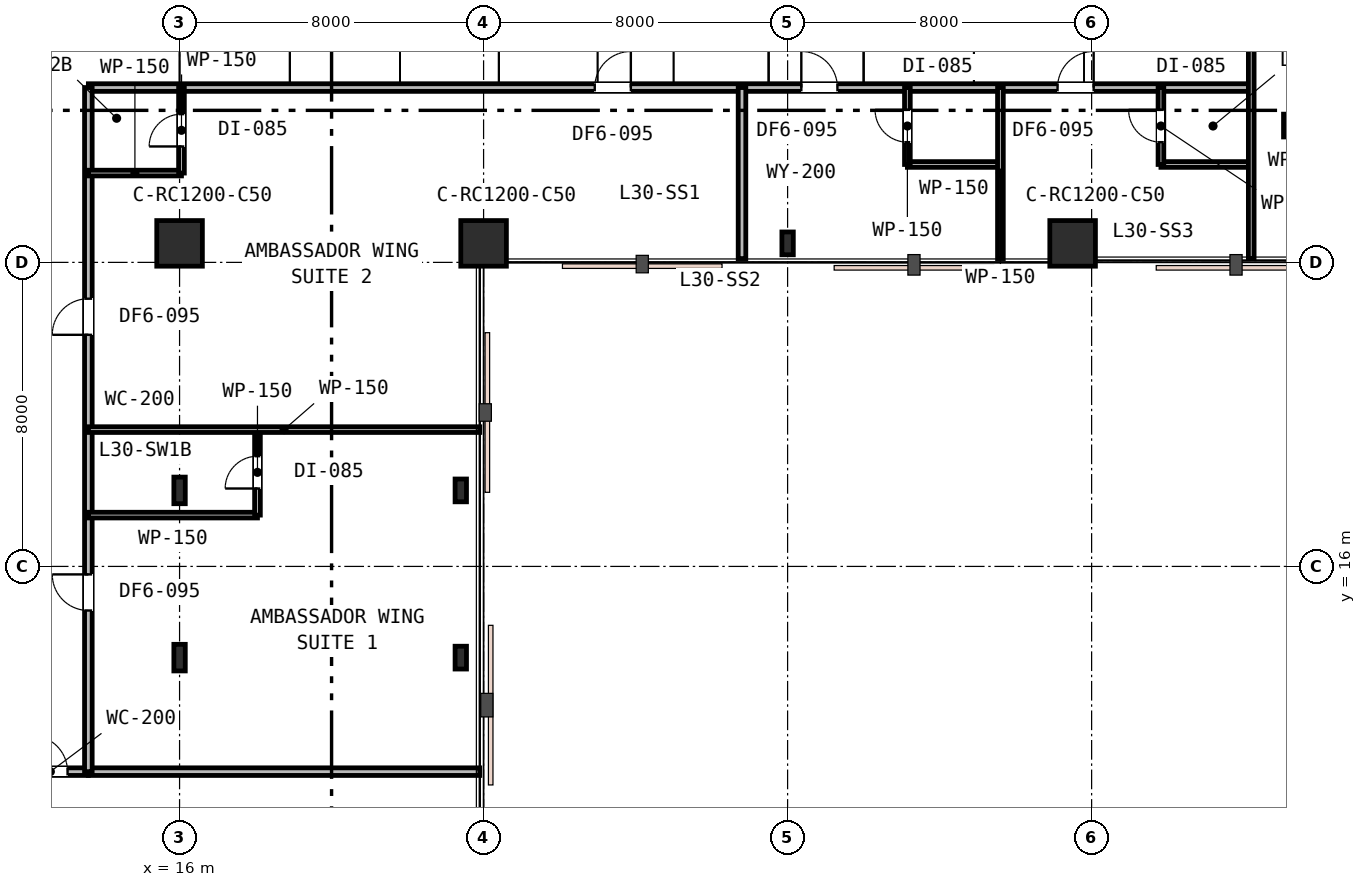
"""IFC4 building model, lengths in metres.
Left out: names, types, materials, properties, quantities, classifications, styles, units other than length and angle.
Written with IfcOpenShell. Run it as: python <this file> out.ifc"""

import sys

from ifc_helpers import new_model, si_unit, direction, frame, frame_2d, origin, origin_2d, place, context, subcontext, project, spatial, rectangle, i_section, extrude, element, fill, save


model = new_model("IFC4")
c1 = context("Model", 3, precision=1e-05, world=origin(), true_north=direction((0.0, 1.0)))
c2 = subcontext(c1, "Body", "Model", "MODEL_VIEW")
j1 = project(units=[si_unit("LENGTHUNIT", "METRE"), si_unit("PLANEANGLEUNIT", "RADIAN")], contexts=[c1])
p1 = place(None, origin())
s1 = spatial("IfcSite", under=j1, at=p1, CompositionType="ELEMENT")
p2 = place(p1, origin())
s2 = spatial("IfcBuilding", under=s1, at=p2, CompositionType="ELEMENT")
p3 = place(p2, frame((0.0, 0.0, 118.8)))
s3 = spatial("IfcBuildingStorey", under=s2, at=p3, CompositionType="ELEMENT", Elevation=118.8)
for number, where, z_axis, x_axis in (
    (1, (16.0, 24.5, 0.0), (0.0, 0.0, 1.0), (1.0, 0.0, 0.0)),
    (2, (24.0, 24.5, 0.0), (0.0, 0.0, 1.0), (1.0, 0.0, 0.0)),
):
    element("IfcColumn", number, at=place(p3, frame(where, z_axis=z_axis, x_axis=x_axis)), inside=s3, PredefinedType="COLUMN", context=c2, shape_type="SweptSolid", body=[
        extrude(rectangle(XDim=1.2, YDim=1.2, at=origin_2d()), origin(), (0.0, 0.0, 1.0), 3.6),
    ])
p4 = place(p3, frame((32.0, 24.5, 0.0), z_axis=(0.0, 0.0, 1.0), x_axis=(1.0, 0.0, 0.0)))
e3 = element("IfcColumn", 3, at=p4, inside=s3, PredefinedType="COLUMN", context=c2, shape_type="SweptSolid", body=[
    extrude(i_section(OverallWidth=0.3, OverallDepth=0.6, WebThickness=0.015, FlangeThickness=0.03, FilletRadius=0.027, at=origin_2d()), origin(), (0.0, 0.0, 1.0), 3.6),
])
p5 = place(p3, frame((39.5, 24.5, 0.0), z_axis=(0.0, 0.0, 1.0), x_axis=(1.0, 0.0, 0.0)))
e4 = element("IfcColumn", 4, at=p5, inside=s3, PredefinedType="COLUMN", context=c2, shape_type="SweptSolid", body=[
    extrude(rectangle(XDim=1.2, YDim=1.2, at=origin_2d()), origin(), (0.0, 0.0, 1.0), 3.6),
])
for number, where, z_axis, x_axis in (
    (5, (45.2, 27.6, 0.0), (0.0, 0.0, 1.0), (1.0, 0.0, 0.0)),
    (6, (23.4, 13.6, 0.0), (0.0, 0.0, 1.0), (1.0, 0.0, 0.0)),
    (7, (23.4, 18.0, 0.0), (0.0, 0.0, 1.0), (1.0, 0.0, 0.0)),
):
    element("IfcColumn", number, at=place(p3, frame(where, z_axis=z_axis, x_axis=x_axis)), inside=s3, PredefinedType="COLUMN", context=c2, shape_type="SweptSolid", body=[
        extrude(i_section(OverallWidth=0.3, OverallDepth=0.6, WebThickness=0.015, FlangeThickness=0.03, FilletRadius=0.027, at=origin_2d()), origin(), (0.0, 0.0, 1.0), 3.6),
    ])
for number, where, z_axis, x_axis in (
    (8, (16.0, 13.6, 0.0), (0.0, 0.0, 1.0), (1.0, 0.0, 0.0)),
    (9, (16.0, 18.0, 0.0), (0.0, 0.0, 1.0), (1.0, 0.0, 0.0)),
):
    element("IfcColumn", number, at=place(p3, frame(where, z_axis=z_axis, x_axis=x_axis)), inside=s3, PredefinedType="COLUMN", context=c2, shape_type="SweptSolid", body=[
        extrude(i_section(OverallWidth=0.3, OverallDepth=0.7, WebThickness=0.017, FlangeThickness=0.032, FilletRadius=0.027, at=origin_2d()), origin(), (0.0, 0.0, 1.0), 3.6),
    ])
p6 = place(p3, frame((13.6, 28.6, 0.0), z_axis=(0.0, 0.0, 1.0), x_axis=(1.0, 0.0, 0.0)))
e10 = element("IfcWall", 10, at=p6, inside=s3, PredefinedType="PARTITIONING", context=c2, shape_type="SweptSolid", body=[
    extrude(rectangle(XDim=30.6, YDim=0.2, at=frame_2d((15.3, 0.0))), origin(), (0.0, 0.0, 1.0), 2.87),
])
p7 = place(p6, frame((13.325, 0.0, 0.0)))
e11 = element("IfcOpeningElement", 11, at=p7, cuts=e10, PredefinedType="OPENING", context=c2, shape_type="SweptSolid", body=[
    extrude(rectangle(XDim=0.95, YDim=2.15, at=frame_2d((0.475, 1.075))), frame((0.0, 0.11, 0.0), z_axis=(0.0, -1.0, 0.0), x_axis=(1.0, 0.0, 0.0)), (0.0, 0.0, 1.0), 0.22),
])
p8 = place(p6, frame((18.761, 0.0, 0.0)))
e12 = element("IfcOpeningElement", 12, at=p8, cuts=e10, PredefinedType="OPENING", context=c2, shape_type="SweptSolid", body=[
    extrude(rectangle(XDim=0.95, YDim=2.15, at=frame_2d((0.475, 1.075))), frame((0.0, 0.11, 0.0), z_axis=(0.0, -1.0, 0.0), x_axis=(1.0, 0.0, 0.0)), (0.0, 0.0, 1.0), 0.22),
])
p9 = place(p6, frame((25.503, 0.0, 0.0)))
e13 = element("IfcOpeningElement", 13, at=p9, cuts=e10, PredefinedType="OPENING", context=c2, shape_type="SweptSolid", body=[
    extrude(rectangle(XDim=0.95, YDim=2.15, at=frame_2d((0.475, 1.075))), frame((0.0, 0.11, 0.0), z_axis=(0.0, -1.0, 0.0), x_axis=(1.0, 0.0, 0.0)), (0.0, 0.0, 1.0), 0.22),
])
p10 = place(p3, frame((13.6, 10.6, 0.0), z_axis=(0.0, 0.0, 1.0), x_axis=(1.0, 0.0, 0.0)))
e14 = element("IfcWall", 14, at=p10, inside=s3, PredefinedType="PARTITIONING", context=c2, shape_type="SweptSolid", body=[
    extrude(rectangle(XDim=10.3, YDim=0.2, at=frame_2d((5.15, 0.0))), origin(), (0.0, 0.0, 1.0), 2.87),
])
p11 = place(p3, frame((11.6, 10.6, 0.0), z_axis=(0.0, 0.0, 1.0), x_axis=(1.0, 0.0, 0.0)))
e15 = element("IfcWall", 15, at=p11, inside=s3, PredefinedType="PARTITIONING", context=c2, shape_type="SweptSolid", body=[
    extrude(rectangle(XDim=2.0, YDim=0.2, at=frame_2d((1.0, 0.0))), origin(), (0.0, 0.0, 1.0), 3.01),
])
p12 = place(p11, frame((0.502, 0.0, 0.0)))
e16 = element("IfcOpeningElement", 16, at=p12, cuts=e15, PredefinedType="OPENING", context=c2, shape_type="SweptSolid", body=[
    extrude(rectangle(XDim=0.95, YDim=2.15, at=frame_2d((0.475, 1.075))), frame((0.0, 0.11, 0.0), z_axis=(0.0, -1.0, 0.0), x_axis=(1.0, 0.0, 0.0)), (0.0, 0.0, 1.0), 0.22),
])
p13 = place(p3, frame((13.6, 10.6, 0.0), z_axis=(0.0, 0.0, 1.0), x_axis=(0.0, 1.0, 0.0)))
e17 = element("IfcWall", 17, at=p13, inside=s3, PredefinedType="PARTITIONING", context=c2, shape_type="SweptSolid", body=[
    extrude(rectangle(XDim=18.0, YDim=0.2, at=frame_2d((9.0, 0.0))), origin(), (0.0, 0.0, 1.0), 2.87),
])
p14 = place(p13, frame((4.24, 0.0, 0.0)))
e18 = element("IfcOpeningElement", 18, at=p14, cuts=e17, PredefinedType="OPENING", context=c2, shape_type="SweptSolid", body=[
    extrude(rectangle(XDim=0.95, YDim=2.15, at=frame_2d((0.475, 1.075))), frame((0.0, 0.11, 0.0), z_axis=(0.0, -1.0, 0.0), x_axis=(1.0, 0.0, 0.0)), (0.0, 0.0, 1.0), 0.22),
])
p15 = place(p13, frame((11.494, 0.0, 0.0)))
e19 = element("IfcOpeningElement", 19, at=p15, cuts=e17, PredefinedType="OPENING", context=c2, shape_type="SweptSolid", body=[
    extrude(rectangle(XDim=0.95, YDim=2.15, at=frame_2d((0.475, 1.075))), frame((0.0, 0.11, 0.0), z_axis=(0.0, -1.0, 0.0), x_axis=(1.0, 0.0, 0.0)), (0.0, 0.0, 1.0), 0.22),
])
p16 = place(p3, frame((13.6, 17.35, 0.0), z_axis=(0.0, 0.0, 1.0), x_axis=(1.0, 0.0, 0.0)))
e20 = element("IfcWall", 20, at=p16, inside=s3, PredefinedType="PARTITIONING", context=c2, shape_type="SweptSolid", body=[
    extrude(rectangle(XDim=4.45, YDim=0.15, at=frame_2d((2.225, 0.0))), origin(), (0.0, 0.0, 1.0), 2.87),
])
p17 = place(p3, frame((18.05, 17.35, 0.0), z_axis=(0.0, 0.0, 1.0), x_axis=(0.0, 1.0, 0.0)))
e21 = element("IfcWall", 21, at=p17, inside=s3, PredefinedType="PARTITIONING", context=c2, shape_type="SweptSolid", body=[
    extrude(rectangle(XDim=2.25, YDim=0.15, at=frame_2d((1.125, 0.0))), origin(), (0.0, 0.0, 1.0), 2.87),
])
p18 = place(p17, frame((0.7, 0.0, 0.0)))
e22 = element("IfcOpeningElement", 22, at=p18, cuts=e21, PredefinedType="OPENING", context=c2, shape_type="SweptSolid", body=[
    extrude(rectangle(XDim=0.85, YDim=2.15, at=frame_2d((0.425, 1.075))), frame((0.0, 0.085, 0.0), z_axis=(0.0, -1.0, 0.0), x_axis=(1.0, 0.0, 0.0)), (0.0, 0.0, 1.0), 0.17),
])
p19 = place(p3, frame((13.6, 19.6, 0.0), z_axis=(0.0, 0.0, 1.0), x_axis=(1.0, 0.0, 0.0)))
e23 = element("IfcWall", 23, at=p19, inside=s3, PredefinedType="PARTITIONING", context=c2, shape_type="SweptSolid", body=[
    extrude(rectangle(XDim=10.3, YDim=0.15, at=frame_2d((5.15, 0.0))), origin(), (0.0, 0.0, 1.0), 2.87),
])
p20 = place(p3, frame((13.6, 26.35, 0.0), z_axis=(0.0, 0.0, 1.0), x_axis=(1.0, 0.0, 0.0)))
e24 = element("IfcWall", 24, at=p20, inside=s3, PredefinedType="PARTITIONING", context=c2, shape_type="SweptSolid", body=[
    extrude(rectangle(XDim=2.45, YDim=0.15, at=frame_2d((1.225, 0.0))), origin(), (0.0, 0.0, 1.0), 2.87),
])
p21 = place(p3, frame((16.05, 26.35, 0.0), z_axis=(0.0, 0.0, 1.0), x_axis=(0.0, 1.0, 0.0)))
e25 = element("IfcWall", 25, at=p21, inside=s3, PredefinedType="PARTITIONING", context=c2, shape_type="SweptSolid", body=[
    extrude(rectangle(XDim=2.25, YDim=0.15, at=frame_2d((1.125, 0.0))), origin(), (0.0, 0.0, 1.0), 2.87),
])
p22 = place(p21, frame((0.7, 0.0, 0.0)))
e26 = element("IfcOpeningElement", 26, at=p22, cuts=e25, PredefinedType="OPENING", context=c2, shape_type="SweptSolid", body=[
    extrude(rectangle(XDim=0.85, YDim=2.15, at=frame_2d((0.425, 1.075))), frame((0.0, 0.085, 0.0), z_axis=(0.0, -1.0, 0.0), x_axis=(1.0, 0.0, 0.0)), (0.0, 0.0, 1.0), 0.17),
])
p23 = place(p3, frame((30.8, 24.1, 0.0), z_axis=(0.0, 0.0, 1.0), x_axis=(0.0, 1.0, 0.0)))
e27 = element("IfcWall", 27, at=p23, inside=s3, PredefinedType="PARTITIONING", context=c2, shape_type="SweptSolid", body=[
    extrude(rectangle(XDim=4.5, YDim=0.2, at=frame_2d((2.25, 0.0))), origin(), (0.0, 0.0, 1.0), 2.96),
])
p24 = place(p3, frame((35.152, 26.576, 0.0), z_axis=(0.0, 0.0, 1.0), x_axis=(1.0, 0.0, 0.0)))
e28 = element("IfcWall", 28, at=p24, inside=s3, PredefinedType="PARTITIONING", context=c2, shape_type="SweptSolid", body=[
    extrude(rectangle(XDim=2.448, YDim=0.15, at=frame_2d((1.224, 0.0))), origin(), (0.0, 0.0, 1.0), 3.01),
])
p25 = place(p3, frame((35.152, 26.576, 0.0), z_axis=(0.0, 0.0, 1.0), x_axis=(0.0, 1.0, 0.0)))
e29 = element("IfcWall", 29, at=p25, inside=s3, PredefinedType="PARTITIONING", context=c2, shape_type="SweptSolid", body=[
    extrude(rectangle(XDim=2.024, YDim=0.15, at=frame_2d((1.012, 0.0))), origin(), (0.0, 0.0, 1.0), 3.33),
])
p26 = place(p25, frame((0.587, 0.0, 0.0)))
e30 = element("IfcOpeningElement", 30, at=p26, cuts=e29, PredefinedType="OPENING", context=c2, shape_type="SweptSolid", body=[
    extrude(rectangle(XDim=0.85, YDim=2.15, at=frame_2d((0.425, 1.075))), frame((0.0, 0.085, 0.0), z_axis=(0.0, -1.0, 0.0), x_axis=(1.0, 0.0, 0.0)), (0.0, 0.0, 1.0), 0.17),
])
p27 = place(p3, frame((37.6, 28.6, 0.0), z_axis=(0.0, 0.0, 1.0), x_axis=(0.0, -1.0, 0.0)))
e31 = element("IfcWall", 31, at=p27, inside=s3, PredefinedType="PARTITIONING", context=c2, shape_type="SweptSolid", body=[
    extrude(rectangle(XDim=4.5, YDim=0.15, at=frame_2d((2.25, 0.0))), origin(), (0.0, 0.0, 1.0), 2.96),
])
p28 = place(p3, frame((41.824, 26.576, 0.0), z_axis=(0.0, 0.0, 1.0), x_axis=(1.0, 0.0, 0.0)))
e32 = element("IfcWall", 32, at=p28, inside=s3, PredefinedType="PARTITIONING", context=c2, shape_type="SweptSolid", body=[
    extrude(rectangle(XDim=2.376, YDim=0.15, at=frame_2d((1.188, 0.0))), origin(), (0.0, 0.0, 1.0), 3.33),
])
p29 = place(p3, frame((41.824, 26.576, 0.0), z_axis=(0.0, 0.0, 1.0), x_axis=(0.0, 1.0, 0.0)))
e33 = element("IfcWall", 33, at=p29, inside=s3, PredefinedType="PARTITIONING", context=c2, shape_type="SweptSolid", body=[
    extrude(rectangle(XDim=2.024, YDim=0.15, at=frame_2d((1.012, 0.0))), origin(), (0.0, 0.0, 1.0), 3.33),
])
p30 = place(p29, frame((0.587, 0.0, 0.0)))
e34 = element("IfcOpeningElement", 34, at=p30, cuts=e33, PredefinedType="OPENING", context=c2, shape_type="SweptSolid", body=[
    extrude(rectangle(XDim=0.85, YDim=2.15, at=frame_2d((0.425, 1.075))), frame((0.0, 0.085, 0.0), z_axis=(0.0, -1.0, 0.0), x_axis=(1.0, 0.0, 0.0)), (0.0, 0.0, 1.0), 0.17),
])
p31 = place(p3, frame((44.2, 30.8, 0.0), z_axis=(0.0, 0.0, 1.0), x_axis=(0.0, -1.0, 0.0)))
e35 = element("IfcWall", 35, at=p31, inside=s3, PredefinedType="PARTITIONING", context=c2, shape_type="SweptSolid", body=[
    extrude(rectangle(XDim=6.7, YDim=0.15, at=frame_2d((3.35, 0.0))), origin(), (0.0, 0.0, 1.0), 2.87),
])
p32 = place(p12, origin())
e36 = element("IfcDoor", 36, at=p32, inside=s3, OperationType="SINGLE_SWING_LEFT", PredefinedType="DOOR", context=c2, shape_type="SweptSolid", body=[
    extrude(rectangle(XDim=0.95, YDim=2.15, at=frame_2d((0.475, 1.075))), frame((0.0, 0.025, 0.0), z_axis=(0.0, -1.0, 0.0), x_axis=(1.0, 0.0, 0.0)), (0.0, 0.0, 1.0), 0.05),
])
fill(e16, e36)
p33 = place(p14, origin())
e37 = element("IfcDoor", 37, at=p33, inside=s3, OperationType="SINGLE_SWING_RIGHT", PredefinedType="DOOR", context=c2, shape_type="SweptSolid", body=[
    extrude(rectangle(XDim=0.95, YDim=2.15, at=frame_2d((0.475, 1.075))), frame((0.0, 0.025, 0.0), z_axis=(0.0, -1.0, 0.0), x_axis=(1.0, 0.0, 0.0)), (0.0, 0.0, 1.0), 0.05),
])
fill(e18, e37)
p34 = place(p18, origin())
e38 = element("IfcDoor", 38, at=p34, inside=s3, OperationType="SINGLE_SWING_LEFT", PredefinedType="DOOR", context=c2, shape_type="SweptSolid", body=[
    extrude(rectangle(XDim=0.85, YDim=2.15, at=frame_2d((0.425, 1.075))), frame((0.0, 0.025, 0.0), z_axis=(0.0, -1.0, 0.0), x_axis=(1.0, 0.0, 0.0)), (0.0, 0.0, 1.0), 0.05),
])
fill(e22, e38)
p35 = place(p15, origin())
e39 = element("IfcDoor", 39, at=p35, inside=s3, OperationType="SINGLE_SWING_LEFT", PredefinedType="DOOR", context=c2, shape_type="SweptSolid", body=[
    extrude(rectangle(XDim=0.95, YDim=2.15, at=frame_2d((0.475, 1.075))), frame((0.0, 0.025, 0.0), z_axis=(0.0, -1.0, 0.0), x_axis=(1.0, 0.0, 0.0)), (0.0, 0.0, 1.0), 0.05),
])
fill(e19, e39)
p36 = place(p22, origin())
e40 = element("IfcDoor", 40, at=p36, inside=s3, OperationType="SINGLE_SWING_LEFT", PredefinedType="DOOR", context=c2, shape_type="SweptSolid", body=[
    extrude(rectangle(XDim=0.85, YDim=2.15, at=frame_2d((0.425, 1.075))), frame((0.0, 0.025, 0.0), z_axis=(0.0, -1.0, 0.0), x_axis=(1.0, 0.0, 0.0)), (0.0, 0.0, 1.0), 0.05),
])
fill(e26, e40)
p37 = place(p7, origin())
e41 = element("IfcDoor", 41, at=p37, inside=s3, OperationType="SINGLE_SWING_RIGHT", PredefinedType="DOOR", context=c2, shape_type="SweptSolid", body=[
    extrude(rectangle(XDim=0.95, YDim=2.15, at=frame_2d((0.475, 1.075))), frame((0.0, 0.025, 0.0), z_axis=(0.0, -1.0, 0.0), x_axis=(1.0, 0.0, 0.0)), (0.0, 0.0, 1.0), 0.05),
])
fill(e11, e41)
p38 = place(p8, origin())
e42 = element("IfcDoor", 42, at=p38, inside=s3, OperationType="SINGLE_SWING_LEFT", PredefinedType="DOOR", context=c2, shape_type="SweptSolid", body=[
    extrude(rectangle(XDim=0.95, YDim=2.15, at=frame_2d((0.475, 1.075))), frame((0.0, 0.025, 0.0), z_axis=(0.0, -1.0, 0.0), x_axis=(1.0, 0.0, 0.0)), (0.0, 0.0, 1.0), 0.05),
])
fill(e12, e42)
p39 = place(p26, origin())
e43 = element("IfcDoor", 43, at=p39, inside=s3, OperationType="SINGLE_SWING_RIGHT", PredefinedType="DOOR", context=c2, shape_type="SweptSolid", body=[
    extrude(rectangle(XDim=0.85, YDim=2.15, at=frame_2d((0.425, 1.075))), frame((0.0, 0.025, 0.0), z_axis=(0.0, -1.0, 0.0), x_axis=(1.0, 0.0, 0.0)), (0.0, 0.0, 1.0), 0.05),
])
fill(e30, e43)
p40 = place(p9, origin())
e44 = element("IfcDoor", 44, at=p40, inside=s3, OperationType="SINGLE_SWING_RIGHT", PredefinedType="DOOR", context=c2, shape_type="SweptSolid", body=[
    extrude(rectangle(XDim=0.95, YDim=2.15, at=frame_2d((0.475, 1.075))), frame((0.0, 0.025, 0.0), z_axis=(0.0, -1.0, 0.0), x_axis=(1.0, 0.0, 0.0)), (0.0, 0.0, 1.0), 0.05),
])
fill(e13, e44)
p41 = place(p30, origin())
e45 = element("IfcDoor", 45, at=p41, inside=s3, OperationType="SINGLE_SWING_RIGHT", PredefinedType="DOOR", context=c2, shape_type="SweptSolid", body=[
    extrude(rectangle(XDim=0.85, YDim=2.15, at=frame_2d((0.425, 1.075))), frame((0.0, 0.025, 0.0), z_axis=(0.0, -1.0, 0.0), x_axis=(1.0, 0.0, 0.0)), (0.0, 0.0, 1.0), 0.05),
])
fill(e34, e45)
save(model, sys.argv[1])
